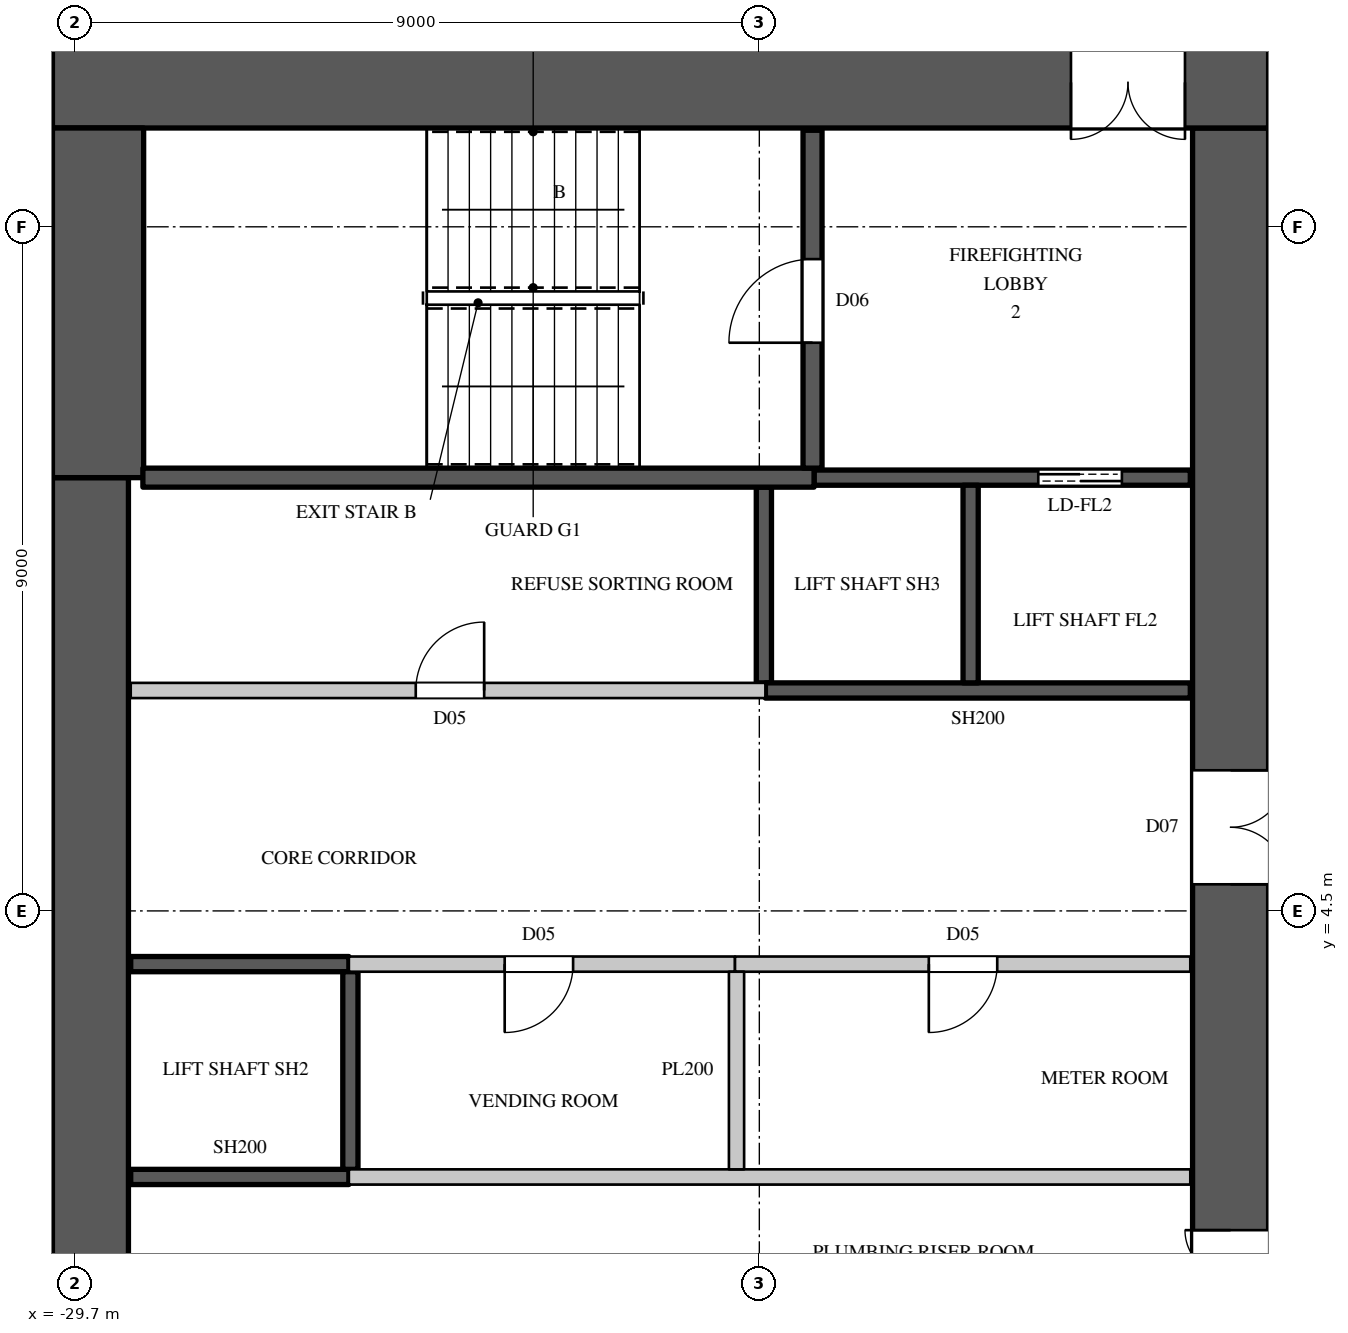
"""IFC4 building model, lengths in metres.
Left out: names, types, materials, properties, quantities, classifications, styles, units other than length and angle.
Written with IfcOpenShell. Run it as: python <this file> out.ifc"""

import sys

from ifc_helpers import new_model, si_unit, direction, frame, frame_2d, origin, place, context, subcontext, project, spatial, rectangle, extrude, element, fill, save


model = new_model("IFC4")
c1 = context("Model", 3, precision=1e-05, world=origin(), true_north=direction((0.0, 1.0)))
c2 = subcontext(c1, "Body", "Model", "MODEL_VIEW")
j1 = project(units=[si_unit("LENGTHUNIT", "METRE"), si_unit("PLANEANGLEUNIT", "RADIAN")], contexts=[c1])
p1 = place(None, origin())
s1 = spatial("IfcSite", under=j1, at=p1, CompositionType="ELEMENT")
p2 = place(p1, origin())
s2 = spatial("IfcBuilding", under=s1, at=p2, CompositionType="ELEMENT")
p3 = place(p2, frame((0.0, 0.0, 55.5)))
s3 = spatial("IfcBuildingStorey", under=s2, at=p3, CompositionType="ELEMENT", Elevation=55.5)
p4 = place(p3, frame((-30.0, 15.4, 0.0), z_axis=(0.0, 0.0, 1.0), x_axis=(1.0, 0.0, 0.0)))
e1 = element("IfcWall", 1, at=p4, inside=s3, PredefinedType="SHEAR", context=c2, shape_type="SweptSolid", body=[
    extrude(rectangle(XDim=16.0, YDim=1.2, at=frame_2d((8.0, 0.0))), origin(), (0.0, 0.0, 1.0), 3.6),
])
p5 = place(p4, frame((13.4, 0.0, 0.0)))
e2 = element("IfcOpeningElement", 2, at=p5, cuts=e1, PredefinedType="OPENING", context=c2, shape_type="SweptSolid", body=[
    extrude(rectangle(XDim=1.5, YDim=2.4, at=frame_2d((0.75, 1.2))), frame((0.0, 0.61, 0.0), z_axis=(0.0, -1.0, 0.0), x_axis=(1.0, 0.0, 0.0)), (0.0, 0.0, 1.0), 1.22),
])
p6 = place(p3, frame((-14.5, -14.8, 0.0), z_axis=(0.0, 0.0, 1.0), x_axis=(0.0, 1.0, 0.0)))
e3 = element("IfcWall", 3, at=p6, inside=s3, PredefinedType="SHEAR", context=c2, shape_type="SweptSolid", body=[
    extrude(rectangle(XDim=29.6, YDim=1.0, at=frame_2d((14.8, 0.0))), origin(), (0.0, 0.0, 1.0), 3.6),
])
p7 = place(p6, frame((8.45, 0.0, 0.0)))
e4 = element("IfcOpeningElement", 4, at=p7, cuts=e3, PredefinedType="OPENING", context=c2, shape_type="SweptSolid", body=[
    extrude(rectangle(XDim=1.5, YDim=2.4, at=frame_2d((0.75, 1.2))), frame((0.0, 0.51, 0.0), z_axis=(0.0, -1.0, 0.0), x_axis=(1.0, 0.0, 0.0)), (0.0, 0.0, 1.0), 1.02),
])
p8 = place(p6, frame((19.65, 0.0, 0.0)))
e5 = element("IfcOpeningElement", 5, at=p8, cuts=e3, PredefinedType="OPENING", context=c2, shape_type="SweptSolid", body=[
    extrude(rectangle(XDim=1.5, YDim=2.4, at=frame_2d((0.75, 1.2))), frame((0.0, 0.51, 0.0), z_axis=(0.0, -1.0, 0.0), x_axis=(1.0, 0.0, 0.0)), (0.0, 0.0, 1.0), 1.02),
])
p9 = place(p6, frame((14.5, 0.0, 0.0)))
e6 = element("IfcOpeningElement", 6, at=p9, cuts=e3, PredefinedType="OPENING", context=c2, shape_type="SweptSolid", body=[
    extrude(rectangle(XDim=0.6, YDim=2.0, at=frame_2d((0.3, 1.0))), frame((0.0, 0.51, 0.0), z_axis=(0.0, -1.0, 0.0), x_axis=(1.0, 0.0, 0.0)), (0.0, 0.0, 1.0), 1.02),
])
p10 = place(p3, frame((-29.5, -10.2, 0.0), z_axis=(0.0, 0.0, 1.0), x_axis=(0.0, 1.0, 0.0)))
e7 = element("IfcWall", 7, at=p10, inside=s3, PredefinedType="SHEAR", context=c2, shape_type="SweptSolid", body=[
    extrude(rectangle(XDim=20.4, YDim=1.0, at=frame_2d((10.2, 0.0))), origin(), (0.0, 0.0, 1.0), 3.6),
])
p11 = place(p3, frame((-29.4, 10.2, 0.0), z_axis=(0.0, 0.0, 1.0), x_axis=(0.0, 1.0, 0.0)))
e8 = element("IfcWall", 8, at=p11, inside=s3, PredefinedType="SHEAR", context=c2, shape_type="SweptSolid", body=[
    extrude(rectangle(XDim=4.6, YDim=1.2, at=frame_2d((2.3, 0.0))), origin(), (0.0, 0.0, 1.0), 3.6),
])
p12 = place(p3, frame((-28.97, 7.4, 0.0), z_axis=(0.0, 0.0, 1.0), x_axis=(1.0, 0.0, 0.0)))
e9 = element("IfcWall", 9, at=p12, inside=s3, PredefinedType="PARTITIONING", context=c2, shape_type="SweptSolid", body=[
    extrude(rectangle(XDim=8.35, YDim=0.2, at=frame_2d((4.175, 0.0))), origin(), (0.0, 0.0, 1.0), 3.3),
])
p13 = place(p12, frame((3.75, 0.0, 0.0)))
e10 = element("IfcOpeningElement", 10, at=p13, cuts=e9, PredefinedType="OPENING", context=c2, shape_type="SweptSolid", body=[
    extrude(rectangle(XDim=0.9, YDim=2.2, at=frame_2d((0.45, 1.1))), frame((0.0, 0.11, 0.0), z_axis=(0.0, -1.0, 0.0), x_axis=(1.0, 0.0, 0.0)), (0.0, 0.0, 1.0), 0.22),
])
p14 = place(p3, frame((-26.1, 3.8, 0.0), z_axis=(0.0, 0.0, 1.0), x_axis=(1.0, 0.0, 0.0)))
e11 = element("IfcWall", 11, at=p14, inside=s3, PredefinedType="PARTITIONING", context=c2, shape_type="SweptSolid", body=[
    extrude(rectangle(XDim=5.08, YDim=0.2, at=frame_2d((2.54, 0.0))), origin(), (0.0, 0.0, 1.0), 3.3),
])
p15 = place(p14, frame((2.05, 0.0, 0.0)))
e12 = element("IfcOpeningElement", 12, at=p15, cuts=e11, PredefinedType="OPENING", context=c2, shape_type="SweptSolid", body=[
    extrude(rectangle(XDim=0.9, YDim=2.2, at=frame_2d((0.45, 1.1))), frame((0.0, 0.11, 0.0), z_axis=(0.0, -1.0, 0.0), x_axis=(1.0, 0.0, 0.0)), (0.0, 0.0, 1.0), 0.22),
])
p16 = place(p3, frame((-26.1, 1.0, 0.0), z_axis=(0.0, 0.0, 1.0), x_axis=(1.0, 0.0, 0.0)))
e13 = element("IfcWall", 13, at=p16, inside=s3, PredefinedType="PARTITIONING", context=c2, shape_type="SweptSolid", body=[
    extrude(rectangle(XDim=11.07, YDim=0.2, at=frame_2d((5.535, 0.0))), origin(), (0.0, 0.0, 1.0), 3.3),
])
p17 = place(p3, frame((-21.02, 3.8, 0.0), z_axis=(0.0, 0.0, 1.0), x_axis=(1.0, 0.0, 0.0)))
e14 = element("IfcWall", 14, at=p17, inside=s3, PredefinedType="PARTITIONING", context=c2, shape_type="SweptSolid", body=[
    extrude(rectangle(XDim=5.99, YDim=0.2, at=frame_2d((2.995, 0.0))), origin(), (0.0, 0.0, 1.0), 3.3),
])
p18 = place(p17, frame((2.55, 0.0, 0.0)))
e15 = element("IfcOpeningElement", 15, at=p18, cuts=e14, PredefinedType="OPENING", context=c2, shape_type="SweptSolid", body=[
    extrude(rectangle(XDim=0.9, YDim=2.2, at=frame_2d((0.45, 1.1))), frame((0.0, 0.11, 0.0), z_axis=(0.0, -1.0, 0.0), x_axis=(1.0, 0.0, 0.0)), (0.0, 0.0, 1.0), 0.22),
])
p19 = place(p3, frame((-21.0, 1.1, 0.0), z_axis=(0.0, 0.0, 1.0), x_axis=(0.0, 1.0, 0.0)))
e16 = element("IfcWall", 16, at=p19, inside=s3, PredefinedType="PARTITIONING", context=c2, shape_type="SweptSolid", body=[
    extrude(rectangle(XDim=2.6, YDim=0.2, at=frame_2d((1.3, 0.0))), origin(), (0.0, 0.0, 1.0), 3.3),
])
for number, where, z_axis, x_axis in (
    (17, (-28.97, 1.0, 0.0), (0.0, 0.0, 1.0), (1.0, 0.0, 0.0)),
    (18, (-28.97, 3.8, 0.0), (0.0, 0.0, 1.0), (1.0, 0.0, 0.0)),
):
    element("IfcWall", number, at=place(p3, frame(where, z_axis=z_axis, x_axis=x_axis)), inside=s3, PredefinedType="SHEAR", context=c2, shape_type="SweptSolid", body=[
        extrude(rectangle(XDim=2.87, YDim=0.2, at=frame_2d((1.435, 0.0))), origin(), (0.0, 0.0, 1.0), 3.3),
    ])
p20 = place(p3, frame((-26.08, 1.1, 0.0), z_axis=(0.0, 0.0, 1.0), x_axis=(0.0, 1.0, 0.0)))
e19 = element("IfcWall", 19, at=p20, inside=s3, PredefinedType="SHEAR", context=c2, shape_type="SweptSolid", body=[
    extrude(rectangle(XDim=2.6, YDim=0.2, at=frame_2d((1.3, 0.0))), origin(), (0.0, 0.0, 1.0), 3.3),
])
p21 = place(p3, frame((-20.64, 7.5, 0.0), z_axis=(0.0, 0.0, 1.0), x_axis=(0.0, 1.0, 0.0)))
e20 = element("IfcWall", 20, at=p21, inside=s3, PredefinedType="SHEAR", context=c2, shape_type="SweptSolid", body=[
    extrude(rectangle(XDim=2.575, YDim=0.2, at=frame_2d((1.288, 0.0))), origin(), (0.0, 0.0, 1.0), 3.3),
])
p22 = place(p3, frame((-20.62, 7.4, 0.0), z_axis=(0.0, 0.0, 1.0), x_axis=(1.0, 0.0, 0.0)))
e21 = element("IfcWall", 21, at=p22, inside=s3, PredefinedType="SHEAR", context=c2, shape_type="SweptSolid", body=[
    extrude(rectangle(XDim=5.59, YDim=0.2, at=frame_2d((2.795, 0.0))), origin(), (0.0, 0.0, 1.0), 3.3),
])
p23 = place(p3, frame((-19.98, 10.2, 0.0), z_axis=(0.0, 0.0, 1.0), x_axis=(1.0, 0.0, 0.0)))
e22 = element("IfcWall", 22, at=p23, inside=s3, PredefinedType="SHEAR", context=c2, shape_type="SweptSolid", body=[
    extrude(rectangle(XDim=4.95, YDim=0.2, at=frame_2d((2.475, 0.0))), origin(), (0.0, 0.0, 1.0), 3.3),
])
p24 = place(p23, frame((2.95, 0.0, 0.0)))
e23 = element("IfcOpeningElement", 23, at=p24, cuts=e22, PredefinedType="OPENING", context=c2, shape_type="SweptSolid", body=[
    extrude(rectangle(XDim=1.1, YDim=2.2, at=frame_2d((0.55, 1.1))), frame((0.0, 0.11, 0.0), z_axis=(0.0, -1.0, 0.0), x_axis=(1.0, 0.0, 0.0)), (0.0, 0.0, 1.0), 0.22),
])
p25 = place(p3, frame((-17.92, 7.5, 0.0), z_axis=(0.0, 0.0, 1.0), x_axis=(0.0, 1.0, 0.0)))
e24 = element("IfcWall", 24, at=p25, inside=s3, PredefinedType="SHEAR", context=c2, shape_type="SweptSolid", body=[
    extrude(rectangle(XDim=2.6, YDim=0.2, at=frame_2d((1.3, 0.0))), origin(), (0.0, 0.0, 1.0), 3.6),
])
p26 = place(p3, frame((-28.81, 10.2, 0.0), z_axis=(0.0, 0.0, 1.0), x_axis=(1.0, 0.0, 0.0)))
e25 = element("IfcWall", 25, at=p26, inside=s3, PredefinedType="SHEAR", context=c2, shape_type="SweptSolid", body=[
    extrude(rectangle(XDim=8.83, YDim=0.25, at=frame_2d((4.415, 0.0))), origin(), (0.0, 0.0, 1.0), 3.3),
])
p27 = place(p3, frame((-20.0, 10.325, 0.0), z_axis=(0.0, 0.0, 1.0), x_axis=(0.0, 1.0, 0.0)))
e26 = element("IfcWall", 26, at=p27, inside=s3, PredefinedType="SHEAR", context=c2, shape_type="SweptSolid", body=[
    extrude(rectangle(XDim=4.445, YDim=0.25, at=frame_2d((2.223, 0.0))), origin(), (0.0, 0.0, 1.0), 3.3),
])
p28 = place(p27, frame((1.65, 0.0, 0.0)))
e27 = element("IfcOpeningElement", 27, at=p28, cuts=e26, PredefinedType="OPENING", context=c2, shape_type="SweptSolid", body=[
    extrude(rectangle(XDim=1.1, YDim=2.2, at=frame_2d((0.55, 1.1))), frame((0.0, 0.135, 0.0), z_axis=(0.0, -1.0, 0.0), x_axis=(1.0, 0.0, 0.0)), (0.0, 0.0, 1.0), 0.27),
])
p29 = place(p28, origin())
e28 = element("IfcDoor", 28, at=p29, inside=s3, OperationType="SINGLE_SWING_LEFT", PredefinedType="DOOR", context=c2, shape_type="SweptSolid", body=[
    extrude(rectangle(XDim=1.1, YDim=2.2, at=frame_2d((0.55, 1.1))), frame((0.0, 0.025, 0.0), z_axis=(0.0, -1.0, 0.0), x_axis=(1.0, 0.0, 0.0)), (0.0, 0.0, 1.0), 0.05),
])
fill(e27, e28)
p30 = place(p15, origin())
e29 = element("IfcDoor", 29, at=p30, inside=s3, OperationType="SINGLE_SWING_RIGHT", PredefinedType="DOOR", context=c2, shape_type="SweptSolid", body=[
    extrude(rectangle(XDim=0.9, YDim=2.2, at=frame_2d((0.45, 1.1))), frame((0.0, 0.025, 0.0), z_axis=(0.0, -1.0, 0.0), x_axis=(1.0, 0.0, 0.0)), (0.0, 0.0, 1.0), 0.05),
])
fill(e12, e29)
p31 = place(p18, origin())
e30 = element("IfcDoor", 30, at=p31, inside=s3, OperationType="SINGLE_SWING_RIGHT", PredefinedType="DOOR", context=c2, shape_type="SweptSolid", body=[
    extrude(rectangle(XDim=0.9, YDim=2.2, at=frame_2d((0.45, 1.1))), frame((0.0, 0.025, 0.0), z_axis=(0.0, -1.0, 0.0), x_axis=(1.0, 0.0, 0.0)), (0.0, 0.0, 1.0), 0.05),
])
fill(e15, e30)
p32 = place(p13, origin())
e31 = element("IfcDoor", 31, at=p32, inside=s3, OperationType="SINGLE_SWING_RIGHT", PredefinedType="DOOR", context=c2, shape_type="SweptSolid", body=[
    extrude(rectangle(XDim=0.9, YDim=2.2, at=frame_2d((0.45, 1.1))), frame((0.0, 0.025, 0.0), z_axis=(0.0, -1.0, 0.0), x_axis=(1.0, 0.0, 0.0)), (0.0, 0.0, 1.0), 0.05),
])
fill(e10, e31)
p33 = place(p24, origin())
e32 = element("IfcDoor", 32, at=p33, inside=s3, OperationType="DOUBLE_DOOR_SLIDING", PredefinedType="DOOR", context=c2, shape_type="SweptSolid", body=[
    extrude(rectangle(XDim=1.1, YDim=2.2, at=frame_2d((0.55, 1.1))), frame((0.0, 0.025, 0.0), z_axis=(0.0, -1.0, 0.0), x_axis=(1.0, 0.0, 0.0)), (0.0, 0.0, 1.0), 0.05),
])
fill(e23, e32)
p34 = place(p5, origin())
e33 = element("IfcDoor", 33, at=p34, inside=s3, OperationType="DOUBLE_DOOR_SINGLE_SWING", PredefinedType="DOOR", context=c2, shape_type="SweptSolid", body=[
    extrude(rectangle(XDim=1.5, YDim=2.4, at=frame_2d((0.75, 1.2))), frame((0.0, 0.025, 0.0), z_axis=(0.0, -1.0, 0.0), x_axis=(1.0, 0.0, 0.0)), (0.0, 0.0, 1.0), 0.05),
])
fill(e2, e33)
p35 = place(p8, origin())
e34 = element("IfcDoor", 34, at=p35, inside=s3, OperationType="DOUBLE_DOOR_SINGLE_SWING", PredefinedType="DOOR", context=c2, shape_type="SweptSolid", body=[
    extrude(rectangle(XDim=1.5, YDim=2.4, at=frame_2d((0.75, 1.2))), frame((0.0, -0.445, 0.0), z_axis=(0.0, -1.0, 0.0), x_axis=(1.0, 0.0, 0.0)), (0.0, 0.0, 1.0), 0.05),
])
fill(e5, e34)
p36 = place(p9, origin())
e35 = element("IfcDoor", 35, at=p36, inside=s3, OperationType="SINGLE_SWING_RIGHT", PredefinedType="DOOR", context=c2, shape_type="SweptSolid", body=[
    extrude(rectangle(XDim=0.6, YDim=2.0, at=frame_2d((0.3, 1.0))), frame((0.0, 0.495, 0.0), z_axis=(0.0, -1.0, 0.0), x_axis=(1.0, 0.0, 0.0)), (0.0, 0.0, 1.0), 0.05),
])
fill(e6, e35)
save(model, sys.argv[1])
